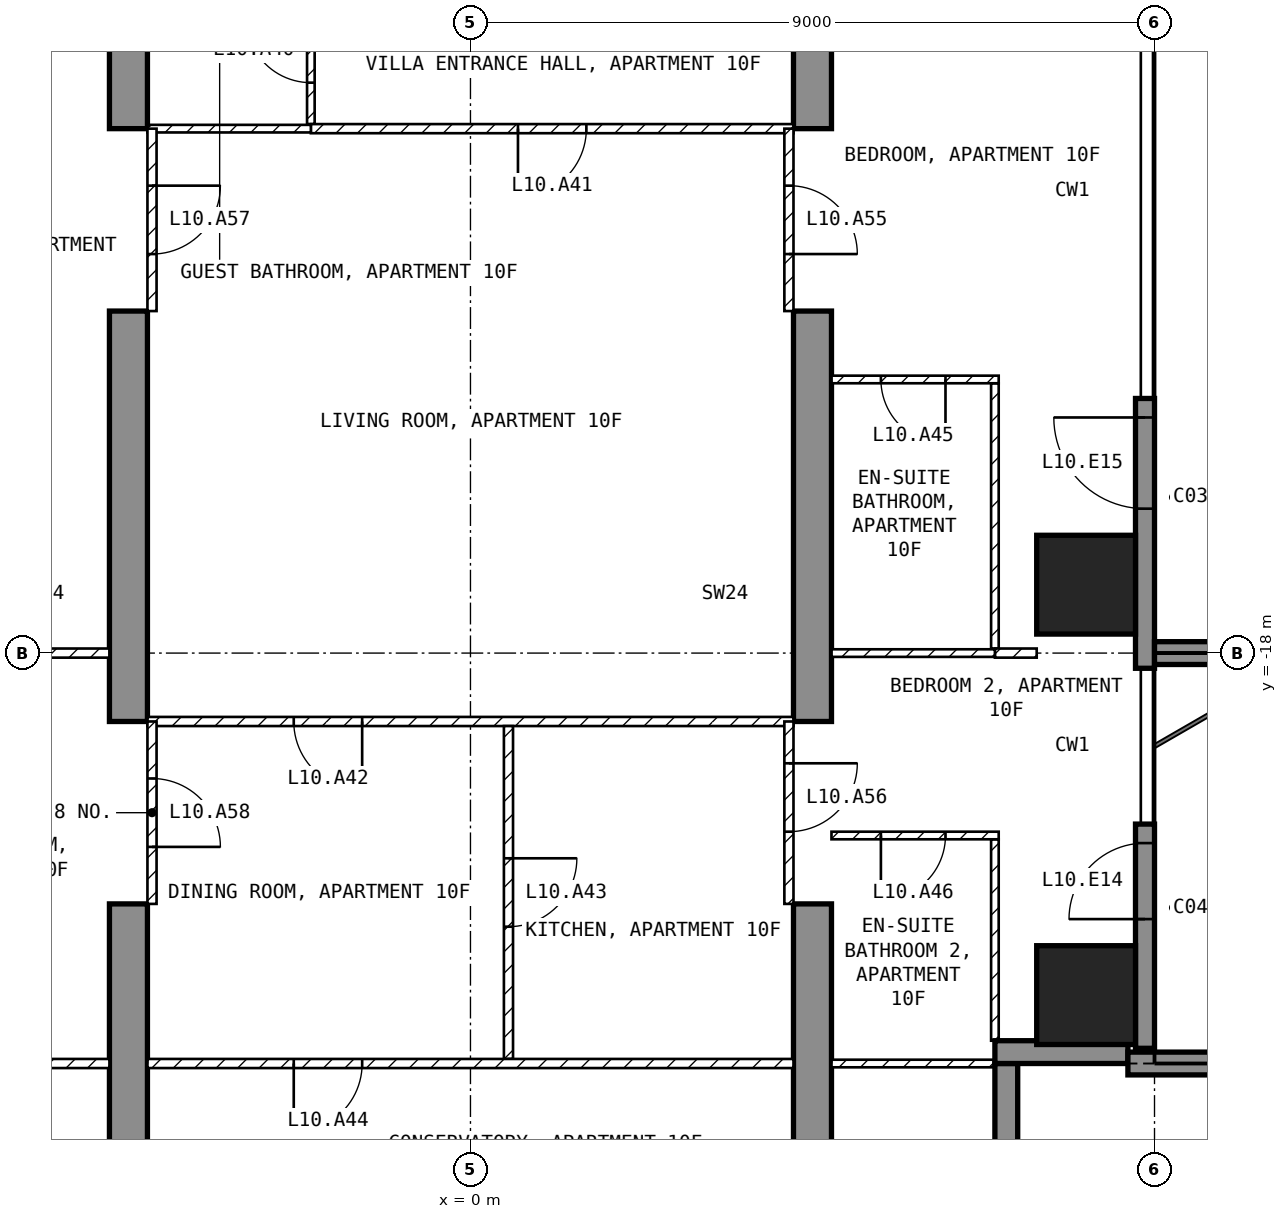
"""IFC4 building model, lengths in metres.
Left out: names, types, materials, properties, quantities, classifications, styles, units other than length and angle.
Written with IfcOpenShell. Run it as: python <this file> out.ifc"""

import sys

from ifc_helpers import new_model, si_unit, direction, frame, frame_2d, origin, origin_2d, place, context, subcontext, project, spatial, polyline, rectangle, outline, extrude, element, fill, save


model = new_model("IFC4")
c1 = context("Model", 3, precision=1e-05, world=origin(), true_north=direction((0.0, 1.0)))
c2 = subcontext(c1, "Body", "Model", "MODEL_VIEW")
j1 = project(units=[si_unit("LENGTHUNIT", "METRE"), si_unit("PLANEANGLEUNIT", "RADIAN")], contexts=[c1])
p1 = place(None, origin())
s1 = spatial("IfcSite", under=j1, at=p1, CompositionType="ELEMENT")
p2 = place(p1, origin())
s2 = spatial("IfcBuilding", under=s1, at=p2, CompositionType="ELEMENT")
p3 = place(p2, frame((0.0, 0.0, 54.0)))
s3 = spatial("IfcBuildingStorey", under=s2, at=p3, CompositionType="ELEMENT", Elevation=54.0)
for number, where, z_axis, x_axis in (
    (1, (8.1, -22.5, -0.25), (0.0, 0.0, 1.0), (1.0, 0.0, 0.0)),
    (2, (8.1, -17.1, -0.25), (0.0, 0.0, 1.0), (1.0, 0.0, 0.0)),
):
    element("IfcColumn", number, at=place(p3, frame(where, z_axis=z_axis, x_axis=x_axis)), inside=s3, PredefinedType="COLUMN", context=c2, shape_type="SweptSolid", body=[
        extrude(rectangle(XDim=1.3, YDim=1.3, at=origin_2d()), origin(), (0.0, 0.0, 1.0), 3.5),
    ])
for number, where, z_axis, x_axis in (
    (3, (-4.75, -25.45, -0.25), (1.0, 0.0, 0.0), (0.0, 1.0, 0.0)),
    (4, (4.25, -25.45, -0.25), (1.0, 0.0, 0.0), (0.0, 1.0, 0.0)),
):
    element("IfcWall", number, at=place(p3, frame(where, z_axis=z_axis, x_axis=x_axis)), inside=s3, PredefinedType="SHEAR", context=c2, shape_type="SweptSolid", body=[
        extrude(outline(polyline([(0.0, 0.0), (4.15, 0.0), (4.15, 2.65), (6.55, 2.65), (6.55, 0.0), (11.95, 0.0), (11.95, 2.65), (14.35, 2.65), (14.35, 0.0), (16.45, 0.0), (16.45, 3.5), (0.0, 3.5), (0.0, 0.0)])), origin(), (0.0, 0.0, 1.0), 0.5),
    ])
p4 = place(p3, frame((8.875, -23.2, 0.0), z_axis=(0.0, 0.0, 1.0), x_axis=(0.0, 1.0, 0.0)))
e5 = element("IfcWall", 5, at=p4, inside=s3, PredefinedType="SOLIDWALL", context=c2, shape_type="SweptSolid", body=[
    extrude(rectangle(XDim=2.95, YDim=0.25, at=frame_2d((1.475, 0.0))), origin(), (0.0, 0.0, 1.0), 3.25),
])
p5 = place(p4, frame((1.7, 0.0, 0.0)))
e6 = element("IfcOpeningElement", 6, at=p5, cuts=e5, PredefinedType="OPENING", context=c2, shape_type="SweptSolid", body=[
    extrude(rectangle(XDim=1.0, YDim=2.4, at=frame_2d((0.5, 1.2))), frame((0.0, 0.135, 0.0), z_axis=(0.0, -1.0, 0.0), x_axis=(1.0, 0.0, 0.0)), (0.0, 0.0, 1.0), 0.27),
])
p6 = place(p3, frame((8.875, -18.2, 0.0), z_axis=(0.0, 0.0, 1.0), x_axis=(0.0, 1.0, 0.0)))
e7 = element("IfcWall", 7, at=p6, inside=s3, PredefinedType="SOLIDWALL", context=c2, shape_type="SweptSolid", body=[
    extrude(rectangle(XDim=3.55, YDim=0.25, at=frame_2d((1.775, 0.0))), origin(), (0.0, 0.0, 1.0), 3.25),
])
p7 = place(p6, frame((2.1, 0.0, 0.0)))
e8 = element("IfcOpeningElement", 8, at=p7, cuts=e7, PredefinedType="OPENING", context=c2, shape_type="SweptSolid", body=[
    extrude(rectangle(XDim=1.2, YDim=2.4, at=frame_2d((0.6, 1.2))), frame((0.0, 0.135, 0.0), z_axis=(0.0, -1.0, 0.0), x_axis=(1.0, 0.0, 0.0)), (0.0, 0.0, 1.0), 0.27),
])
p8 = place(p3, frame((7.05, -25.2, 0.0), z_axis=(0.0, 0.0, 1.0), x_axis=(0.0, 1.0, 0.0)))
e9 = element("IfcWall", 9, at=p8, inside=s3, PredefinedType="SOLIDWALL", context=c2, shape_type="SweptSolid", body=[
    extrude(rectangle(XDim=1.8, YDim=0.3, at=frame_2d((0.9, 0.0))), origin(), (0.0, 0.0, 1.0), 3.25),
])
p9 = place(p3, frame((6.9, -23.25, 0.0), z_axis=(0.0, 0.0, 1.0), x_axis=(1.0, 0.0, 0.0)))
e10 = element("IfcWall", 10, at=p9, inside=s3, PredefinedType="SOLIDWALL", context=c2, shape_type="SweptSolid", body=[
    extrude(rectangle(XDim=1.75, YDim=0.3, at=frame_2d((0.875, 0.0))), origin(), (0.0, 0.0, 1.0), 3.25),
])
p10 = place(p3, frame((8.65, -23.4, 0.0), z_axis=(0.0, 0.0, 1.0), x_axis=(1.0, 0.0, 0.0)))
e11 = element("IfcWall", 11, at=p10, inside=s3, PredefinedType="SOLIDWALL", context=c2, shape_type="SweptSolid", body=[
    extrude(rectangle(XDim=3.05, YDim=0.3, at=frame_2d((1.525, 0.0))), origin(), (0.0, 0.0, 1.0), 3.25),
])
p11 = place(p3, frame((9.0, -18.0, 0.0), z_axis=(0.0, 0.0, 1.0), x_axis=(1.0, 0.0, 0.0)))
e12 = element("IfcWall", 12, at=p11, inside=s3, PredefinedType="SOLIDWALL", context=c2, shape_type="SweptSolid", body=[
    extrude(rectangle(XDim=2.7, YDim=0.3, at=frame_2d((1.35, 0.0))), origin(), (0.0, 0.0, 1.0), 3.25),
])
p12 = place(p3, frame((-2.1, -11.04, 0.0), z_axis=(0.0, 0.0, 1.0), x_axis=(0.0, 1.0, 0.0)))
e13 = element("IfcWall", 13, at=p12, inside=s3, PredefinedType="PARTITIONING", context=c2, shape_type="SweptSolid", body=[
    extrude(rectangle(XDim=1.94, YDim=0.1, at=frame_2d((0.97, 0.0))), origin(), (0.0, 0.0, 1.0), 3.25),
])
p13 = place(p12, frame((0.545, 0.0, 0.0)))
e14 = element("IfcOpeningElement", 14, at=p13, cuts=e13, PredefinedType="OPENING", context=c2, shape_type="SweptSolid", body=[
    extrude(rectangle(XDim=0.85, YDim=2.1, at=frame_2d((0.425, 1.05))), frame((0.0, 0.06, 0.0), z_axis=(0.0, -1.0, 0.0), x_axis=(1.0, 0.0, 0.0)), (0.0, 0.0, 1.0), 0.12),
])
p14 = place(p3, frame((4.25, -11.1, 0.0), z_axis=(0.0, 0.0, 1.0), x_axis=(-1.0, 0.0, 0.0)))
e15 = element("IfcWall", 15, at=p14, inside=s3, PredefinedType="PARTITIONING", context=c2, shape_type="SweptSolid", body=[
    extrude(rectangle(XDim=6.35, YDim=0.12, at=frame_2d((3.175, 0.0))), origin(), (0.0, 0.0, 1.0), 3.25),
])
p15 = place(p14, frame((2.725, 0.0, 0.0)))
e16 = element("IfcOpeningElement", 16, at=p15, cuts=e15, PredefinedType="OPENING", context=c2, shape_type="SweptSolid", body=[
    extrude(rectangle(XDim=0.9, YDim=2.1, at=frame_2d((0.45, 1.05))), frame((0.0, 0.07, 0.0), z_axis=(0.0, -1.0, 0.0), x_axis=(1.0, 0.0, 0.0)), (0.0, 0.0, 1.0), 0.14),
])
p16 = place(p3, frame((-2.1, -11.1, 0.0), z_axis=(0.0, 0.0, 1.0), x_axis=(-1.0, 0.0, 0.0)))
e17 = element("IfcWall", 17, at=p16, inside=s3, PredefinedType="PARTITIONING", context=c2, shape_type="SweptSolid", body=[
    extrude(rectangle(XDim=2.15, YDim=0.1, at=frame_2d((1.075, 0.0))), origin(), (0.0, 0.0, 1.0), 3.25),
])
p17 = place(p3, frame((4.25, -18.9, 0.0), z_axis=(0.0, 0.0, 1.0), x_axis=(-1.0, 0.0, 0.0)))
e18 = element("IfcWall", 18, at=p17, inside=s3, PredefinedType="PARTITIONING", context=c2, shape_type="SweptSolid", body=[
    extrude(rectangle(XDim=8.5, YDim=0.12, at=frame_2d((4.25, 0.0))), origin(), (0.0, 0.0, 1.0), 3.25),
])
p18 = place(p17, frame((5.675, 0.0, 0.0)))
e19 = element("IfcOpeningElement", 19, at=p18, cuts=e18, PredefinedType="OPENING", context=c2, shape_type="SweptSolid", body=[
    extrude(rectangle(XDim=0.9, YDim=2.1, at=frame_2d((0.45, 1.05))), frame((0.0, 0.07, 0.0), z_axis=(0.0, -1.0, 0.0), x_axis=(1.0, 0.0, 0.0)), (0.0, 0.0, 1.0), 0.14),
])
p19 = place(p3, frame((0.5, -18.96, 0.0), z_axis=(0.0, 0.0, 1.0), x_axis=(0.0, -1.0, 0.0)))
e20 = element("IfcWall", 20, at=p19, inside=s3, PredefinedType="PARTITIONING", context=c2, shape_type="SweptSolid", body=[
    extrude(rectangle(XDim=4.38, YDim=0.12, at=frame_2d((2.19, 0.0))), origin(), (0.0, 0.0, 1.0), 3.25),
])
p20 = place(p19, frame((1.74, 0.0, 0.0)))
e21 = element("IfcOpeningElement", 21, at=p20, cuts=e20, PredefinedType="OPENING", context=c2, shape_type="SweptSolid", body=[
    extrude(rectangle(XDim=0.9, YDim=2.1, at=frame_2d((0.45, 1.05))), frame((0.0, 0.07, 0.0), z_axis=(0.0, -1.0, 0.0), x_axis=(1.0, 0.0, 0.0)), (0.0, 0.0, 1.0), 0.14),
])
p21 = place(p3, frame((4.25, -23.4, 0.0), z_axis=(0.0, 0.0, 1.0), x_axis=(-1.0, 0.0, 0.0)))
e22 = element("IfcWall", 22, at=p21, inside=s3, PredefinedType="PARTITIONING", context=c2, shape_type="SweptSolid", body=[
    extrude(rectangle(XDim=8.5, YDim=0.12, at=frame_2d((4.25, 0.0))), origin(), (0.0, 0.0, 1.0), 3.25),
])
p22 = place(p21, frame((5.675, 0.0, 0.0)))
e23 = element("IfcOpeningElement", 23, at=p22, cuts=e22, PredefinedType="OPENING", context=c2, shape_type="SweptSolid", body=[
    extrude(rectangle(XDim=0.9, YDim=2.1, at=frame_2d((0.45, 1.05))), frame((0.0, 0.07, 0.0), z_axis=(0.0, -1.0, 0.0), x_axis=(1.0, 0.0, 0.0)), (0.0, 0.0, 1.0), 0.14),
])
p23 = place(p3, frame((6.9, -17.94, 0.0), z_axis=(0.0, 0.0, 1.0), x_axis=(0.0, 1.0, 0.0)))
e24 = element("IfcWall", 24, at=p23, inside=s3, PredefinedType="PARTITIONING", context=c2, shape_type="SweptSolid", body=[
    extrude(rectangle(XDim=3.49, YDim=0.1, at=frame_2d((1.745, 0.0))), origin(), (0.0, 0.0, 1.0), 3.25),
])
p24 = place(p3, frame((6.95, -14.4, 0.0), z_axis=(0.0, 0.0, 1.0), x_axis=(-1.0, 0.0, 0.0)))
e25 = element("IfcWall", 25, at=p24, inside=s3, PredefinedType="PARTITIONING", context=c2, shape_type="SweptSolid", body=[
    extrude(rectangle(XDim=2.2, YDim=0.1, at=frame_2d((1.1, 0.0))), origin(), (0.0, 0.0, 1.0), 3.25),
])
p25 = place(p24, frame((0.7, 0.0, 0.0)))
e26 = element("IfcOpeningElement", 26, at=p25, cuts=e25, PredefinedType="OPENING", context=c2, shape_type="SweptSolid", body=[
    extrude(rectangle(XDim=0.85, YDim=2.1, at=frame_2d((0.425, 1.05))), frame((0.0, 0.06, 0.0), z_axis=(0.0, -1.0, 0.0), x_axis=(1.0, 0.0, 0.0)), (0.0, 0.0, 1.0), 0.12),
])
p26 = place(p3, frame((7.45, -18.0, 0.0), z_axis=(0.0, 0.0, 1.0), x_axis=(-1.0, 0.0, 0.0)))
e27 = element("IfcWall", 27, at=p26, inside=s3, PredefinedType="PARTITIONING", context=c2, shape_type="SweptSolid", body=[
    extrude(rectangle(XDim=0.55, YDim=0.12, at=frame_2d((0.275, 0.0))), origin(), (0.0, 0.0, 1.0), 3.25),
])
p27 = place(p3, frame((6.9, -18.0, 0.0), z_axis=(0.0, 0.0, 1.0), x_axis=(-1.0, 0.0, 0.0)))
e28 = element("IfcWall", 28, at=p27, inside=s3, PredefinedType="PARTITIONING", context=c2, shape_type="SweptSolid", body=[
    extrude(rectangle(XDim=2.15, YDim=0.1, at=frame_2d((1.075, 0.0))), origin(), (0.0, 0.0, 1.0), 3.25),
])
p28 = place(p3, frame((6.9, -23.1, 0.0), z_axis=(0.0, 0.0, 1.0), x_axis=(0.0, 1.0, 0.0)))
e29 = element("IfcWall", 29, at=p28, inside=s3, PredefinedType="PARTITIONING", context=c2, shape_type="SweptSolid", body=[
    extrude(rectangle(XDim=2.65, YDim=0.1, at=frame_2d((1.325, 0.0))), origin(), (0.0, 0.0, 1.0), 3.25),
])
p29 = place(p3, frame((6.95, -20.4, 0.0), z_axis=(0.0, 0.0, 1.0), x_axis=(-1.0, 0.0, 0.0)))
e30 = element("IfcWall", 30, at=p29, inside=s3, PredefinedType="PARTITIONING", context=c2, shape_type="SweptSolid", body=[
    extrude(rectangle(XDim=2.2, YDim=0.1, at=frame_2d((1.1, 0.0))), origin(), (0.0, 0.0, 1.0), 3.25),
])
p30 = place(p29, frame((0.7, 0.0, 0.0)))
e31 = element("IfcOpeningElement", 31, at=p30, cuts=e30, PredefinedType="OPENING", context=c2, shape_type="SweptSolid", body=[
    extrude(rectangle(XDim=0.85, YDim=2.1, at=frame_2d((0.425, 1.05))), frame((0.0, 0.06, 0.0), z_axis=(0.0, -1.0, 0.0), x_axis=(1.0, 0.0, 0.0)), (0.0, 0.0, 1.0), 0.12),
])
p31 = place(p3, frame((7.12, -23.4, 0.0), z_axis=(0.0, 0.0, 1.0), x_axis=(-1.0, 0.0, 0.0)))
e32 = element("IfcWall", 32, at=p31, inside=s3, PredefinedType="PARTITIONING", context=c2, shape_type="SweptSolid", body=[
    extrude(rectangle(XDim=2.37, YDim=0.1, at=frame_2d((1.185, 0.0))), origin(), (0.0, 0.0, 1.0), 3.25),
])
p32 = place(p3, frame((-4.75, -18.0, 0.0), z_axis=(0.0, 0.0, 1.0), x_axis=(-1.0, 0.0, 0.0)))
e33 = element("IfcWall", 33, at=p32, inside=s3, PredefinedType="PARTITIONING", context=c2, shape_type="SweptSolid", body=[
    extrude(rectangle(XDim=2.7, YDim=0.12, at=frame_2d((1.35, 0.0))), origin(), (0.0, 0.0, 1.0), 3.25),
])
p33 = place(p3, frame((-4.75, -23.4, 0.0), z_axis=(0.0, 0.0, 1.0), x_axis=(-1.0, 0.0, 0.0)))
e34 = element("IfcWall", 34, at=p33, inside=s3, PredefinedType="PARTITIONING", context=c2, shape_type="SweptSolid", body=[
    extrude(rectangle(XDim=2.37, YDim=0.12, at=frame_2d((1.185, 0.0))), origin(), (0.0, 0.0, 1.0), 3.25),
])
p34 = place(p3, frame((4.19, -11.1, 0.0), z_axis=(0.0, 0.0, 1.0), x_axis=(0.0, -1.0, 0.0)))
e35 = element("IfcWall", 35, at=p34, inside=s3, PredefinedType="PARTITIONING", context=c2, shape_type="SweptSolid", body=[
    extrude(rectangle(XDim=2.4, YDim=0.12, at=frame_2d((1.2, 0.0))), origin(), (0.0, 0.0, 1.0), 2.4),
])
p35 = place(p34, frame((0.75, 0.0, 0.0)))
e36 = element("IfcOpeningElement", 36, at=p35, cuts=e35, PredefinedType="OPENING", context=c2, shape_type="SweptSolid", body=[
    extrude(rectangle(XDim=0.9, YDim=2.1, at=frame_2d((0.45, 1.05))), frame((0.0, 0.07, 0.0), z_axis=(0.0, -1.0, 0.0), x_axis=(1.0, 0.0, 0.0)), (0.0, 0.0, 1.0), 0.14),
])
p36 = place(p3, frame((4.19, -18.9, 0.0), z_axis=(0.0, 0.0, 1.0), x_axis=(0.0, -1.0, 0.0)))
e37 = element("IfcWall", 37, at=p36, inside=s3, PredefinedType="PARTITIONING", context=c2, shape_type="SweptSolid", body=[
    extrude(rectangle(XDim=2.4, YDim=0.12, at=frame_2d((1.2, 0.0))), origin(), (0.0, 0.0, 1.0), 2.4),
])
p37 = place(p36, frame((0.55, 0.0, 0.0)))
e38 = element("IfcOpeningElement", 38, at=p37, cuts=e37, PredefinedType="OPENING", context=c2, shape_type="SweptSolid", body=[
    extrude(rectangle(XDim=0.9, YDim=2.1, at=frame_2d((0.45, 1.05))), frame((0.0, 0.07, 0.0), z_axis=(0.0, -1.0, 0.0), x_axis=(1.0, 0.0, 0.0)), (0.0, 0.0, 1.0), 0.14),
])
p38 = place(p3, frame((-4.19, -11.1, 0.0), z_axis=(0.0, 0.0, 1.0), x_axis=(0.0, -1.0, 0.0)))
e39 = element("IfcWall", 39, at=p38, inside=s3, PredefinedType="PARTITIONING", context=c2, shape_type="SweptSolid", body=[
    extrude(rectangle(XDim=2.4, YDim=0.12, at=frame_2d((1.2, 0.0))), origin(), (0.0, 0.0, 1.0), 2.4),
])
p39 = place(p38, frame((0.75, 0.0, 0.0)))
e40 = element("IfcOpeningElement", 40, at=p39, cuts=e39, PredefinedType="OPENING", context=c2, shape_type="SweptSolid", body=[
    extrude(rectangle(XDim=0.9, YDim=2.1, at=frame_2d((0.45, 1.05))), frame((0.0, 0.07, 0.0), z_axis=(0.0, -1.0, 0.0), x_axis=(1.0, 0.0, 0.0)), (0.0, 0.0, 1.0), 0.14),
])
p40 = place(p3, frame((-4.19, -18.9, 0.0), z_axis=(0.0, 0.0, 1.0), x_axis=(0.0, -1.0, 0.0)))
e41 = element("IfcWall", 41, at=p40, inside=s3, PredefinedType="PARTITIONING", context=c2, shape_type="SweptSolid", body=[
    extrude(rectangle(XDim=2.4, YDim=0.12, at=frame_2d((1.2, 0.0))), origin(), (0.0, 0.0, 1.0), 2.4),
])
p41 = place(p40, frame((0.75, 0.0, 0.0)))
e42 = element("IfcOpeningElement", 42, at=p41, cuts=e41, PredefinedType="OPENING", context=c2, shape_type="SweptSolid", body=[
    extrude(rectangle(XDim=0.9, YDim=2.1, at=frame_2d((0.45, 1.05))), frame((0.0, 0.07, 0.0), z_axis=(0.0, -1.0, 0.0), x_axis=(1.0, 0.0, 0.0)), (0.0, 0.0, 1.0), 0.14),
])
p42 = place(p5, origin())
e43 = element("IfcDoor", 43, at=p42, inside=s3, OperationType="SINGLE_SWING_LEFT", PredefinedType="DOOR", context=c2, shape_type="SweptSolid", body=[
    extrude(rectangle(XDim=1.0, YDim=2.4, at=frame_2d((0.5, 1.2))), frame((0.0, 0.025, 0.0), z_axis=(0.0, -1.0, 0.0), x_axis=(1.0, 0.0, 0.0)), (0.0, 0.0, 1.0), 0.05),
])
fill(e6, e43)
p43 = place(p7, origin())
e44 = element("IfcDoor", 44, at=p43, inside=s3, OperationType="SINGLE_SWING_RIGHT", PredefinedType="DOOR", context=c2, shape_type="SweptSolid", body=[
    extrude(rectangle(XDim=1.2, YDim=2.4, at=frame_2d((0.6, 1.2))), frame((0.0, 0.025, 0.0), z_axis=(0.0, -1.0, 0.0), x_axis=(1.0, 0.0, 0.0)), (0.0, 0.0, 1.0), 0.05),
])
fill(e8, e44)
p44 = place(p13, origin())
e45 = element("IfcDoor", 45, at=p44, inside=s3, OperationType="SINGLE_SWING_RIGHT", PredefinedType="DOOR", context=c2, shape_type="SweptSolid", body=[
    extrude(rectangle(XDim=0.85, YDim=2.1, at=frame_2d((0.425, 1.05))), frame((0.0, 0.025, 0.0), z_axis=(0.0, -1.0, 0.0), x_axis=(1.0, 0.0, 0.0)), (0.0, 0.0, 1.0), 0.05),
])
fill(e14, e45)
p45 = place(p15, origin())
e46 = element("IfcDoor", 46, at=p45, inside=s3, OperationType="SINGLE_SWING_RIGHT", PredefinedType="DOOR", context=c2, shape_type="SweptSolid", body=[
    extrude(rectangle(XDim=0.9, YDim=2.1, at=frame_2d((0.45, 1.05))), frame((0.0, 0.025, 0.0), z_axis=(0.0, -1.0, 0.0), x_axis=(1.0, 0.0, 0.0)), (0.0, 0.0, 1.0), 0.05),
])
fill(e16, e46)
p46 = place(p18, origin())
e47 = element("IfcDoor", 47, at=p46, inside=s3, OperationType="SINGLE_SWING_LEFT", PredefinedType="DOOR", context=c2, shape_type="SweptSolid", body=[
    extrude(rectangle(XDim=0.9, YDim=2.1, at=frame_2d((0.45, 1.05))), frame((0.0, 0.025, 0.0), z_axis=(0.0, -1.0, 0.0), x_axis=(1.0, 0.0, 0.0)), (0.0, 0.0, 1.0), 0.05),
])
fill(e19, e47)
p47 = place(p20, origin())
e48 = element("IfcDoor", 48, at=p47, inside=s3, OperationType="SINGLE_SWING_LEFT", PredefinedType="DOOR", context=c2, shape_type="SweptSolid", body=[
    extrude(rectangle(XDim=0.9, YDim=2.1, at=frame_2d((0.45, 1.05))), frame((0.0, 0.025, 0.0), z_axis=(0.0, -1.0, 0.0), x_axis=(1.0, 0.0, 0.0)), (0.0, 0.0, 1.0), 0.05),
])
fill(e21, e48)
p48 = place(p22, origin())
e49 = element("IfcDoor", 49, at=p48, inside=s3, OperationType="SINGLE_SWING_RIGHT", PredefinedType="DOOR", context=c2, shape_type="SweptSolid", body=[
    extrude(rectangle(XDim=0.9, YDim=2.1, at=frame_2d((0.45, 1.05))), frame((0.0, 0.025, 0.0), z_axis=(0.0, -1.0, 0.0), x_axis=(1.0, 0.0, 0.0)), (0.0, 0.0, 1.0), 0.05),
])
fill(e23, e49)
p49 = place(p25, origin())
e50 = element("IfcDoor", 50, at=p49, inside=s3, OperationType="SINGLE_SWING_LEFT", PredefinedType="DOOR", context=c2, shape_type="SweptSolid", body=[
    extrude(rectangle(XDim=0.85, YDim=2.1, at=frame_2d((0.425, 1.05))), frame((0.0, 0.025, 0.0), z_axis=(0.0, -1.0, 0.0), x_axis=(1.0, 0.0, 0.0)), (0.0, 0.0, 1.0), 0.05),
])
fill(e26, e50)
p50 = place(p30, origin())
e51 = element("IfcDoor", 51, at=p50, inside=s3, OperationType="SINGLE_SWING_RIGHT", PredefinedType="DOOR", context=c2, shape_type="SweptSolid", body=[
    extrude(rectangle(XDim=0.85, YDim=2.1, at=frame_2d((0.425, 1.05))), frame((0.0, 0.025, 0.0), z_axis=(0.0, -1.0, 0.0), x_axis=(1.0, 0.0, 0.0)), (0.0, 0.0, 1.0), 0.05),
])
fill(e31, e51)
p51 = place(p35, origin())
e52 = element("IfcDoor", 52, at=p51, inside=s3, OperationType="SINGLE_SWING_RIGHT", PredefinedType="DOOR", context=c2, shape_type="SweptSolid", body=[
    extrude(rectangle(XDim=0.9, YDim=2.1, at=frame_2d((0.45, 1.05))), frame((0.0, 0.025, 0.0), z_axis=(0.0, -1.0, 0.0), x_axis=(1.0, 0.0, 0.0)), (0.0, 0.0, 1.0), 0.05),
])
fill(e36, e52)
p52 = place(p37, origin())
e53 = element("IfcDoor", 53, at=p52, inside=s3, OperationType="SINGLE_SWING_LEFT", PredefinedType="DOOR", context=c2, shape_type="SweptSolid", body=[
    extrude(rectangle(XDim=0.9, YDim=2.1, at=frame_2d((0.45, 1.05))), frame((0.0, 0.025, 0.0), z_axis=(0.0, -1.0, 0.0), x_axis=(1.0, 0.0, 0.0)), (0.0, 0.0, 1.0), 0.05),
])
fill(e38, e53)
p53 = place(p39, origin())
e54 = element("IfcDoor", 54, at=p53, inside=s3, OperationType="SINGLE_SWING_LEFT", PredefinedType="DOOR", context=c2, shape_type="SweptSolid", body=[
    extrude(rectangle(XDim=0.9, YDim=2.1, at=frame_2d((0.45, 1.05))), frame((0.0, 0.025, 0.0), z_axis=(0.0, -1.0, 0.0), x_axis=(1.0, 0.0, 0.0)), (0.0, 0.0, 1.0), 0.05),
])
fill(e40, e54)
p54 = place(p41, origin())
e55 = element("IfcDoor", 55, at=p54, inside=s3, OperationType="SINGLE_SWING_RIGHT", PredefinedType="DOOR", context=c2, shape_type="SweptSolid", body=[
    extrude(rectangle(XDim=0.9, YDim=2.1, at=frame_2d((0.45, 1.05))), frame((0.0, 0.025, 0.0), z_axis=(0.0, -1.0, 0.0), x_axis=(1.0, 0.0, 0.0)), (0.0, 0.0, 1.0), 0.05),
])
fill(e42, e55)
save(model, sys.argv[1])
